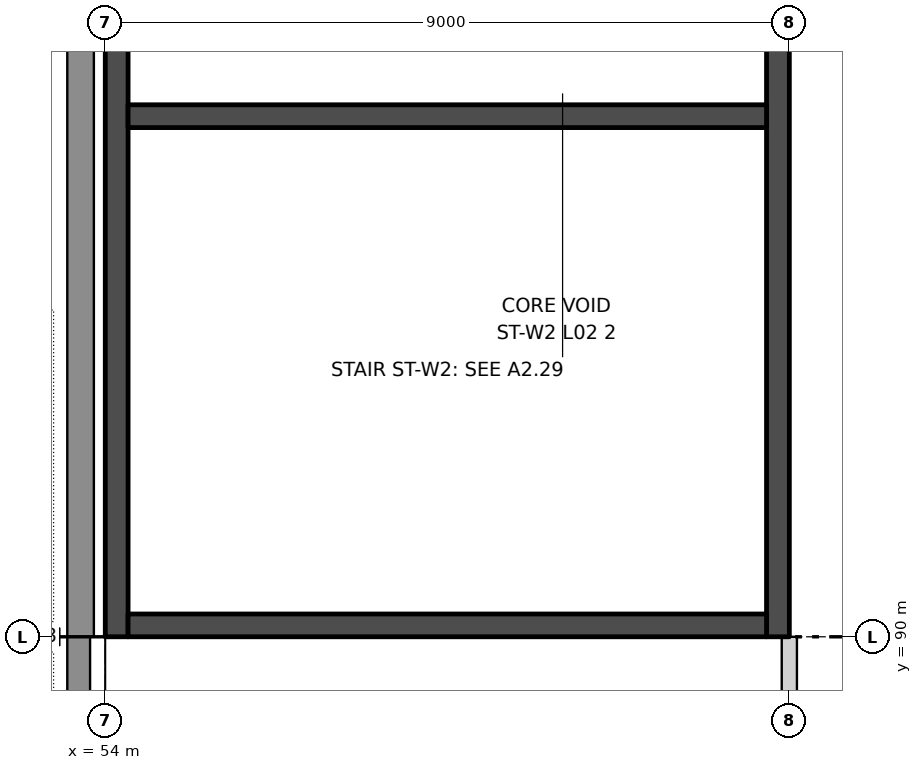
"""IFC4 building model, lengths in metres.
Left out: names, types, materials, properties, quantities, classifications, styles, units other than length and angle.
Written with IfcOpenShell. Run it as: python <this file> out.ifc"""

import sys

from ifc_helpers import new_model, si_unit, direction, frame, frame_2d, origin, place, context, subcontext, project, spatial, rectangle, extrude, element, save


model = new_model("IFC4")
c1 = context("Model", 3, precision=1e-05, world=origin(), true_north=direction((0.0, 1.0)))
c2 = subcontext(c1, "Body", "Model", "MODEL_VIEW")
j1 = project(units=[si_unit("LENGTHUNIT", "METRE"), si_unit("PLANEANGLEUNIT", "RADIAN")], contexts=[c1])
p1 = place(None, origin())
s1 = spatial("IfcSite", under=j1, at=p1, CompositionType="ELEMENT")
p2 = place(p1, origin())
s2 = spatial("IfcBuilding", under=s1, at=p2, CompositionType="ELEMENT")
p3 = place(p2, frame((0.0, 0.0, 11.5)))
s3 = spatial("IfcBuildingStorey", under=s2, at=p3, CompositionType="ELEMENT", Elevation=11.5)
p4 = place(p3, frame((63.0, 81.4, 0.0), z_axis=(0.0, 0.0, 1.0), x_axis=(0.0, 1.0, 0.0)))
e1 = element("IfcWall", 1, at=p4, inside=s3, PredefinedType="PARTITIONING", context=c2, shape_type="SweptSolid", body=[
    extrude(rectangle(XDim=8.6, YDim=0.2, at=frame_2d((4.3, 0.0))), origin(), (0.0, 0.0, 1.0), 9.15),
])
p5 = place(p4, frame((3.8, 0.0, 0.0)))
e2 = element("IfcOpeningElement", 2, at=p5, cuts=e1, PredefinedType="OPENING", context=c2, shape_type="SweptSolid", body=[
    extrude(rectangle(XDim=1.0, YDim=2.1, at=frame_2d((0.5, 1.05))), frame((0.0, 0.11, 0.0), z_axis=(0.0, -1.0, 0.0), x_axis=(1.0, 0.0, 0.0)), (0.0, 0.0, 1.0), 0.22),
])
p6 = place(p3, frame((53.65, 90.0, 0.0), z_axis=(0.0, 0.0, 1.0), x_axis=(0.0, -1.0, 0.0)))
e3 = element("IfcWall", 3, at=p6, inside=s3, PredefinedType="SOLIDWALL", context=c2, shape_type="SweptSolid", body=[
    extrude(rectangle(XDim=8.55, YDim=0.3, at=frame_2d((4.275, 0.0))), origin(), (0.0, 0.0, 1.0), 10.5),
])
p7 = place(p3, frame((53.675, 99.0, 0.0), z_axis=(0.0, 0.0, 1.0), x_axis=(0.0, -1.0, 0.0)))
e4 = element("IfcWall", 4, at=p7, inside=s3, PredefinedType="SOLIDWALL", context=c2, shape_type="SweptSolid", body=[
    extrude(rectangle(XDim=9.0, YDim=0.35, at=frame_2d((4.5, 0.0))), origin(), (0.0, 0.0, 1.0), 10.5),
])
p8 = place(p3, frame((62.85, 108.0, 0.0), z_axis=(0.0, 0.0, 1.0), x_axis=(0.0, -1.0, 0.0)))
e5 = element("IfcWall", 5, at=p8, inside=s3, PredefinedType="SHEAR", context=c2, shape_type="SweptSolid", body=[
    extrude(rectangle(XDim=18.0, YDim=0.3, at=frame_2d((9.0, 0.0))), origin(), (0.0, 0.0, 1.0), 10.5),
])
p9 = place(p8, frame((1.5, 0.0, 0.0)))
e6 = element("IfcOpeningElement", 6, at=p9, cuts=e5, PredefinedType="OPENING", context=c2, shape_type="SweptSolid", body=[
    extrude(rectangle(XDim=1.2, YDim=2.1, at=frame_2d((0.6, 1.05))), frame((0.0, 0.16, 0.0), z_axis=(0.0, -1.0, 0.0), x_axis=(1.0, 0.0, 0.0)), (0.0, 0.0, 1.0), 0.32),
])
p10 = place(p3, frame((54.15, 108.0, 0.0), z_axis=(0.0, 0.0, 1.0), x_axis=(0.0, -1.0, 0.0)))
e7 = element("IfcWall", 7, at=p10, inside=s3, PredefinedType="SHEAR", context=c2, shape_type="SweptSolid", body=[
    extrude(rectangle(XDim=18.0, YDim=0.3, at=frame_2d((9.0, 0.0))), origin(), (0.0, 0.0, 1.0), 10.5),
])
for number, where, z_axis, x_axis in (
    (8, (62.7, 90.15, 0.0), (0.0, 0.0, 1.0), (-1.0, 0.0, 0.0)),
    (9, (62.7, 96.85, 0.0), (0.0, 0.0, 1.0), (-1.0, 0.0, 0.0)),
):
    element("IfcWall", number, at=place(p3, frame(where, z_axis=z_axis, x_axis=x_axis)), inside=s3, PredefinedType="SHEAR", context=c2, shape_type="SweptSolid", body=[
        extrude(rectangle(XDim=8.4, YDim=0.3, at=frame_2d((4.2, 0.0))), origin(), (0.0, 0.0, 1.0), 10.5),
    ])
save(model, sys.argv[1])
